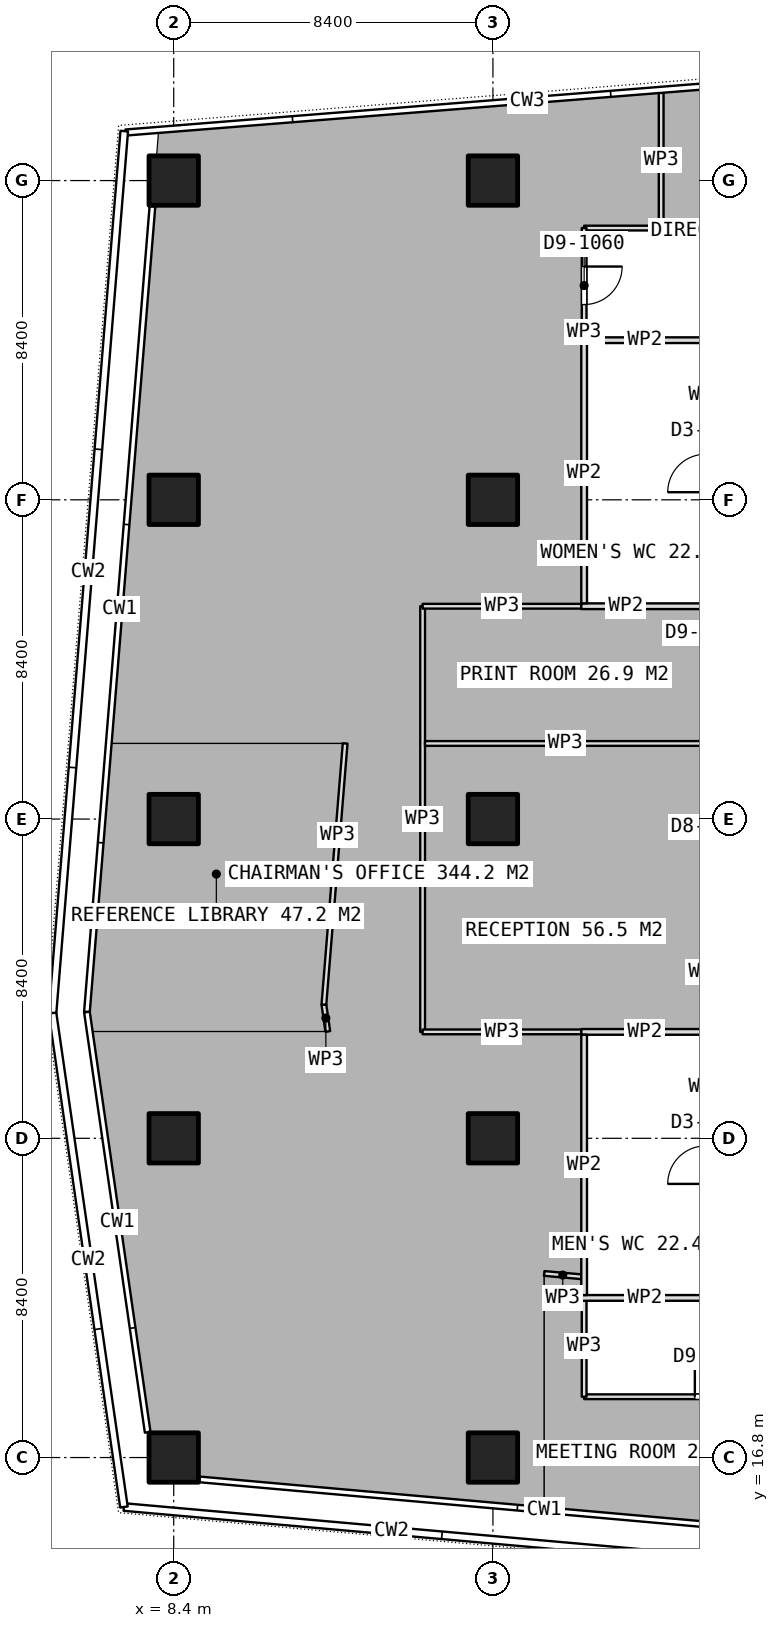
"""IFC4 building model, lengths in metres.
Left out: names, types, materials, properties, quantities, classifications, styles, units other than length and angle.
Written with IfcOpenShell. Run it as: python <this file> out.ifc"""

import sys

from ifc_helpers import new_model, si_unit, direction, frame, frame_2d, origin, origin_2d, place, context, subcontext, project, spatial, rectangle, extrude, element, fill, save


model = new_model("IFC4")
c1 = context("Model", 3, precision=1e-05, world=origin(), true_north=direction((0.0, 1.0)))
c2 = subcontext(c1, "Body", "Model", "MODEL_VIEW")
j1 = project(units=[si_unit("LENGTHUNIT", "METRE"), si_unit("PLANEANGLEUNIT", "RADIAN")], contexts=[c1])
p1 = place(None, origin())
s1 = spatial("IfcSite", under=j1, at=p1, CompositionType="ELEMENT")
p2 = place(p1, origin())
s2 = spatial("IfcBuilding", under=s1, at=p2, CompositionType="ELEMENT")
p3 = place(p2, frame((0.0, 0.0, 287.6)))
s3 = spatial("IfcBuildingStorey", under=s2, at=p3, CompositionType="ELEMENT", Elevation=287.6)
for number, where, z_axis, x_axis in (
    (1, (8.4, 16.8, 0.0), (0.0, 0.0, 1.0), (1.0, 0.0, 0.0)),
    (2, (8.4, 25.2, 0.0), (0.0, 0.0, 1.0), (1.0, 0.0, 0.0)),
    (3, (8.4, 33.6, 0.0), (0.0, 0.0, 1.0), (1.0, 0.0, 0.0)),
    (4, (8.4, 42.0, 0.0), (0.0, 0.0, 1.0), (1.0, 0.0, 0.0)),
    (5, (8.4, 50.4, 0.0), (0.0, 0.0, 1.0), (1.0, 0.0, 0.0)),
    (6, (16.8, 16.8, 0.0), (0.0, 0.0, 1.0), (1.0, 0.0, 0.0)),
    (7, (16.8, 25.2, 0.0), (0.0, 0.0, 1.0), (1.0, 0.0, 0.0)),
    (8, (16.8, 33.6, 0.0), (0.0, 0.0, 1.0), (1.0, 0.0, 0.0)),
    (9, (16.8, 42.0, 0.0), (0.0, 0.0, 1.0), (1.0, 0.0, 0.0)),
    (10, (16.8, 50.4, 0.0), (0.0, 0.0, 1.0), (1.0, 0.0, 0.0)),
):
    element("IfcColumn", number, at=place(p3, frame(where, z_axis=z_axis, x_axis=x_axis)), inside=s3, PredefinedType="COLUMN", context=c2, shape_type="SweptSolid", body=[
        extrude(rectangle(XDim=1.3, YDim=1.3, at=origin_2d()), origin(), (0.0, 0.0, 1.0), 3.75),
    ])
for number, where, z_axis, x_axis in (
    (11, (19.125, 39.2, 0.0), (0.0, 0.0, 1.0), (1.0, 0.0, 0.0)),
    (12, (19.125, 46.2, 0.0), (0.0, 0.0, 1.0), (1.0, 0.0, 0.0)),
):
    element("IfcWall", number, at=place(p3, frame(where, z_axis=z_axis, x_axis=x_axis)), inside=s3, PredefinedType="PARTITIONING", context=c2, shape_type="SweptSolid", body=[
        extrude(rectangle(XDim=3.35, YDim=0.15, at=frame_2d((1.675, 0.0))), origin(), (0.0, 0.0, 1.0), 3.45),
    ])
p4 = place(p3, frame((19.2, 39.275, 0.0), z_axis=(0.0, 0.0, 1.0), x_axis=(0.0, 1.0, 0.0)))
e13 = element("IfcWall", 13, at=p4, inside=s3, PredefinedType="PARTITIONING", context=c2, shape_type="SweptSolid", body=[
    extrude(rectangle(XDim=6.85, YDim=0.15, at=frame_2d((3.425, 0.0))), origin(), (0.0, 0.0, 1.0), 3.45),
])
for number, where, z_axis, x_axis in (
    (14, (19.125, 21.0, 0.0), (0.0, 0.0, 1.0), (1.0, 0.0, 0.0)),
    (15, (19.125, 28.0, 0.0), (0.0, 0.0, 1.0), (1.0, 0.0, 0.0)),
):
    element("IfcWall", number, at=place(p3, frame(where, z_axis=z_axis, x_axis=x_axis)), inside=s3, PredefinedType="PARTITIONING", context=c2, shape_type="SweptSolid", body=[
        extrude(rectangle(XDim=3.35, YDim=0.15, at=frame_2d((1.675, 0.0))), origin(), (0.0, 0.0, 1.0), 3.45),
    ])
p5 = place(p3, frame((19.2, 21.075, 0.0), z_axis=(0.0, 0.0, 1.0), x_axis=(0.0, 1.0, 0.0)))
e16 = element("IfcWall", 16, at=p5, inside=s3, PredefinedType="PARTITIONING", context=c2, shape_type="SweptSolid", body=[
    extrude(rectangle(XDim=6.85, YDim=0.15, at=frame_2d((3.425, 0.0))), origin(), (0.0, 0.0, 1.0), 3.45),
])
p6 = place(p3, frame((26.119, 49.15, 0.0), z_axis=(0.0, 0.0, 1.0), x_axis=(-1.0, 0.0, 0.0)))
e17 = element("IfcWall", 17, at=p6, inside=s3, PredefinedType="PARTITIONING", context=c2, shape_type="SweptSolid", body=[
    extrude(rectangle(XDim=4.892, YDim=0.125, at=frame_2d((2.446, 0.0))), origin(), (0.0, 0.0, 1.0), 3.45),
])
p7 = place(p3, frame((21.227, 49.15, 0.0), z_axis=(0.0, 0.0, 1.0), x_axis=(0.0, 1.0, 0.0)))
e18 = element("IfcWall", 18, at=p7, inside=s3, PredefinedType="PARTITIONING", context=c2, shape_type="SweptSolid", body=[
    extrude(rectangle(XDim=3.558, YDim=0.125, at=frame_2d((1.779, 0.0))), origin(), (0.0, 0.0, 1.0), 3.45),
])
p8 = place(p3, frame((14.95, 39.2, 0.0), z_axis=(0.0, 0.0, 1.0), x_axis=(0.0, -1.0, 0.0)))
e19 = element("IfcWall", 19, at=p8, inside=s3, PredefinedType="PARTITIONING", context=c2, shape_type="SweptSolid", body=[
    extrude(rectangle(XDim=11.2, YDim=0.125, at=frame_2d((5.6, 0.0))), origin(), (0.0, 0.0, 1.0), 3.45),
])
p9 = place(p3, frame((14.95, 28.0, 0.0), z_axis=(0.0, 0.0, 1.0), x_axis=(1.0, 0.0, 0.0)))
e20 = element("IfcWall", 20, at=p9, inside=s3, PredefinedType="PARTITIONING", context=c2, shape_type="SweptSolid", body=[
    extrude(rectangle(XDim=4.174, YDim=0.125, at=frame_2d((2.087, 0.0))), origin(), (0.0, 0.0, 1.0), 3.45),
])
p10 = place(p3, frame((19.125, 21.557, 0.0), z_axis=(0.0, 0.0, 1.0), x_axis=(-0.996029022323, 0.089029133943, 0.0)))
e21 = element("IfcWall", 21, at=p10, inside=s3, PredefinedType="PARTITIONING", context=c2, shape_type="SweptSolid", body=[
    extrude(rectangle(XDim=0.979, YDim=0.125, at=frame_2d((0.49, 0.0))), origin(), (0.0, 0.0, 1.0), 3.45),
])
p11 = place(p3, frame((12.455, 28.011, 0.0), z_axis=(0.0, 0.0, 1.0), x_axis=(-0.144195365637, 0.989549239062, 0.0)))
e22 = element("IfcWall", 22, at=p11, inside=s3, PredefinedType="PARTITIONING", context=c2, shape_type="SweptSolid", body=[
    extrude(rectangle(XDim=0.715, YDim=0.125, at=frame_2d((0.357, 0.0))), origin(), (0.0, 0.0, 1.0), 3.45),
])
p12 = place(p3, frame((12.352, 28.718, 0.0), z_axis=(0.0, 0.0, 1.0), x_axis=(0.081064051258, 0.996708894108, 0.0)))
e23 = element("IfcWall", 23, at=p12, inside=s3, PredefinedType="PARTITIONING", context=c2, shape_type="SweptSolid", body=[
    extrude(rectangle(XDim=6.894, YDim=0.125, at=frame_2d((3.447, 0.0))), origin(), (0.0, 0.0, 1.0), 3.45),
])
p13 = place(p3, frame((21.226, 49.15, 0.0), z_axis=(0.0, 0.0, 1.0), x_axis=(-1.0, 0.0, 0.0)))
e24 = element("IfcWall", 24, at=p13, inside=s3, PredefinedType="PARTITIONING", context=c2, shape_type="SweptSolid", body=[
    extrude(rectangle(XDim=2.026, YDim=0.125, at=frame_2d((1.013, 0.0))), origin(), (0.0, 0.0, 1.0), 3.45),
])
p14 = place(p3, frame((19.2, 49.15, 0.0), z_axis=(0.0, 0.0, 1.0), x_axis=(0.0, -1.0, 0.0)))
e25 = element("IfcWall", 25, at=p14, inside=s3, PredefinedType="PARTITIONING", context=c2, shape_type="SweptSolid", body=[
    extrude(rectangle(XDim=3.025, YDim=0.125, at=frame_2d((1.512, 0.0))), origin(), (0.0, 0.0, 1.0), 3.45),
])
p15 = place(p14, frame((1.012, 0.0, 0.0)))
e26 = element("IfcOpeningElement", 26, at=p15, cuts=e25, PredefinedType="OPENING", context=c2, shape_type="SweptSolid", body=[
    extrude(rectangle(XDim=1.0, YDim=2.1, at=frame_2d((0.5, 1.05))), frame((0.0, 0.073, 0.0), z_axis=(0.0, -1.0, 0.0), x_axis=(1.0, 0.0, 0.0)), (0.0, 0.0, 1.0), 0.145),
])
p16 = place(p3, frame((19.124, 39.2, 0.0), z_axis=(0.0, 0.0, 1.0), x_axis=(-1.0, 0.0, 0.0)))
e27 = element("IfcWall", 27, at=p16, inside=s3, PredefinedType="PARTITIONING", context=c2, shape_type="SweptSolid", body=[
    extrude(rectangle(XDim=4.174, YDim=0.125, at=frame_2d((2.087, 0.0))), origin(), (0.0, 0.0, 1.0), 3.45),
])
p17 = place(p3, frame((19.2, 18.4, 0.0), z_axis=(0.0, 0.0, 1.0), x_axis=(1.0, 0.0, 0.0)))
e28 = element("IfcWall", 28, at=p17, inside=s3, PredefinedType="PARTITIONING", context=c2, shape_type="SweptSolid", body=[
    extrude(rectangle(XDim=6.826, YDim=0.125, at=frame_2d((3.413, 0.0))), origin(), (0.0, 0.0, 1.0), 3.45),
])
p18 = place(p17, frame((2.913, 0.0, 0.0)))
e29 = element("IfcOpeningElement", 29, at=p18, cuts=e28, PredefinedType="OPENING", context=c2, shape_type="SweptSolid", body=[
    extrude(rectangle(XDim=1.0, YDim=2.1, at=frame_2d((0.5, 1.05))), frame((0.0, 0.073, 0.0), z_axis=(0.0, -1.0, 0.0), x_axis=(1.0, 0.0, 0.0)), (0.0, 0.0, 1.0), 0.145),
])
p19 = place(p3, frame((19.2, 21.075, 0.0), z_axis=(0.0, 0.0, 1.0), x_axis=(0.0, -1.0, 0.0)))
e30 = element("IfcWall", 30, at=p19, inside=s3, PredefinedType="PARTITIONING", context=c2, shape_type="SweptSolid", body=[
    extrude(rectangle(XDim=2.675, YDim=0.125, at=frame_2d((1.337, 0.0))), origin(), (0.0, 0.0, 1.0), 3.45),
])
p20 = place(p3, frame((15.012, 35.589, 0.0), z_axis=(0.0, 0.0, 1.0), x_axis=(1.0, 0.0, 0.0)))
e31 = element("IfcWall", 31, at=p20, inside=s3, PredefinedType="PARTITIONING", context=c2, shape_type="SweptSolid", body=[
    extrude(rectangle(XDim=7.388, YDim=0.125, at=frame_2d((3.694, 0.0))), origin(), (0.0, 0.0, 1.0), 3.45),
])
p21 = place(p15, origin())
e32 = element("IfcDoor", 32, at=p21, inside=s3, OperationType="SINGLE_SWING_LEFT", PredefinedType="DOOR", context=c2, shape_type="SweptSolid", body=[
    extrude(rectangle(XDim=1.0, YDim=2.1, at=frame_2d((0.5, 1.05))), frame((0.0, 0.025, 0.0), z_axis=(0.0, -1.0, 0.0), x_axis=(1.0, 0.0, 0.0)), (0.0, 0.0, 1.0), 0.05),
])
fill(e26, e32)
p22 = place(p18, origin())
e33 = element("IfcDoor", 33, at=p22, inside=s3, OperationType="SINGLE_SWING_LEFT", PredefinedType="DOOR", context=c2, shape_type="SweptSolid", body=[
    extrude(rectangle(XDim=1.0, YDim=2.1, at=frame_2d((0.5, 1.05))), frame((0.0, 0.025, 0.0), z_axis=(0.0, -1.0, 0.0), x_axis=(1.0, 0.0, 0.0)), (0.0, 0.0, 1.0), 0.05),
])
fill(e29, e33)
save(model, sys.argv[1])
